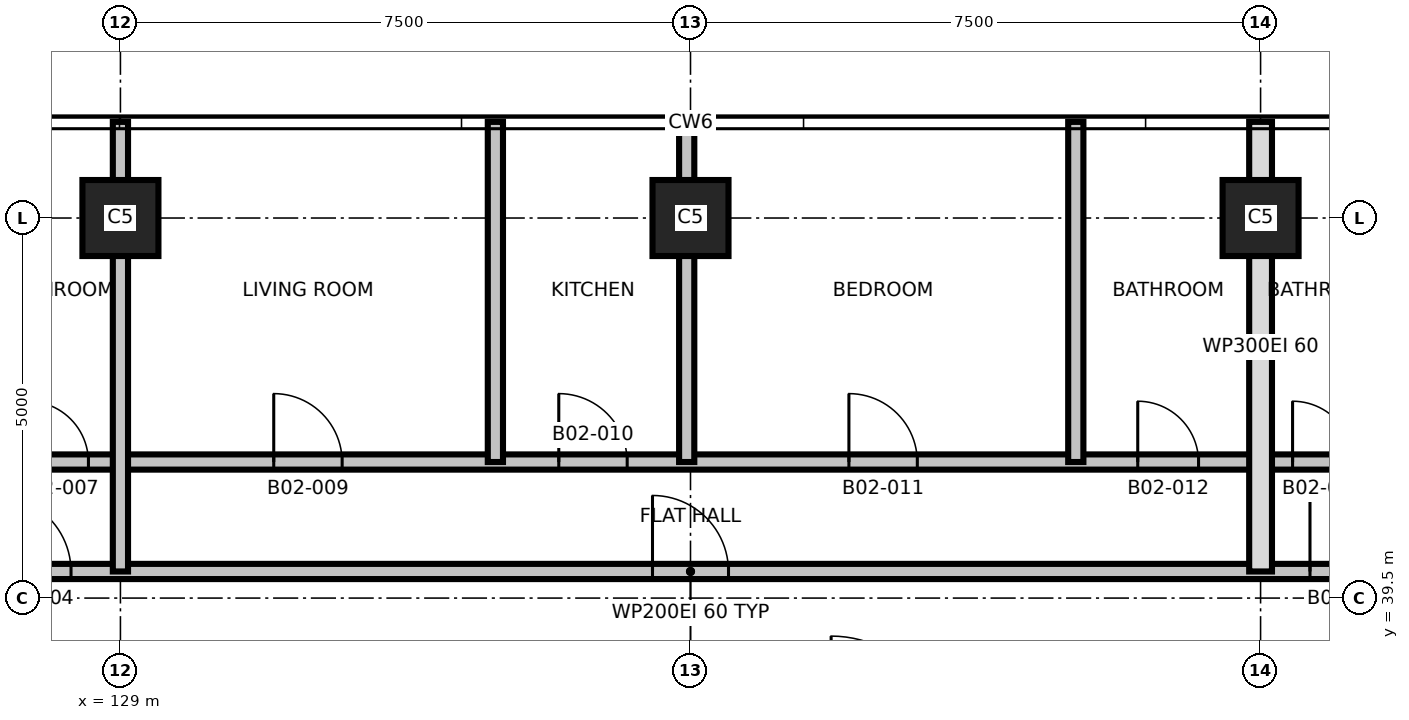
"""IFC4 building model, lengths in metres.
Left out: names, types, materials, properties, quantities, classifications, styles, units other than length and angle.
Written with IfcOpenShell. Run it as: python <this file> out.ifc"""

import sys

from ifc_helpers import new_model, si_unit, direction, frame, frame_2d, origin, origin_2d, place, context, subcontext, project, spatial, rectangle, extrude, element, fill, save


model = new_model("IFC4")
c1 = context("Model", 3, precision=1e-05, world=origin(), true_north=direction((0.0, 1.0)))
c2 = subcontext(c1, "Body", "Model", "MODEL_VIEW")
j1 = project(units=[si_unit("LENGTHUNIT", "METRE"), si_unit("PLANEANGLEUNIT", "RADIAN")], contexts=[c1])
p1 = place(None, origin())
s1 = spatial("IfcSite", under=j1, at=p1, CompositionType="ELEMENT")
p2 = place(p1, origin())
s2 = spatial("IfcBuilding", under=s1, at=p2, CompositionType="ELEMENT")
p3 = place(p2, frame((0.0, 0.0, 48.3)))
s3 = spatial("IfcBuildingStorey", under=s2, at=p3, CompositionType="ELEMENT", Elevation=48.3)
for number, where, z_axis, x_axis in (
    (1, (129.0, 44.5, 0.0), (0.0, 0.0, 1.0), (1.0, 0.0, 0.0)),
    (2, (136.5, 44.5, 0.0), (0.0, 0.0, 1.0), (1.0, 0.0, 0.0)),
    (3, (144.0, 44.5, 0.0), (0.0, 0.0, 1.0), (1.0, 0.0, 0.0)),
):
    element("IfcColumn", number, at=place(p3, frame(where, z_axis=z_axis, x_axis=x_axis)), inside=s3, PredefinedType="COLUMN", context=c2, shape_type="SweptSolid", body=[
        extrude(rectangle(XDim=1.0, YDim=1.0, at=origin_2d()), origin(), (0.0, 0.0, 1.0), 3.7),
    ])
p4 = place(p3, frame((120.235, 39.85, 0.0), z_axis=(0.0, 0.0, 1.0), x_axis=(1.0, 0.0, 0.0)))
e4 = element("IfcWall", 4, at=p4, inside=s3, PredefinedType="PARTITIONING", context=c2, shape_type="SweptSolid", body=[
    extrude(rectangle(XDim=32.53, YDim=0.2, at=frame_2d((16.265, 0.0))), origin(), (0.0, 0.0, 1.0), 3.4),
])
p5 = place(p4, frame((7.115, 0.0, 0.0)))
e5 = element("IfcOpeningElement", 5, at=p5, cuts=e4, PredefinedType="OPENING", context=c2, shape_type="SweptSolid", body=[
    extrude(rectangle(XDim=1.0, YDim=2.1, at=frame_2d((0.5, 1.05))), frame((0.0, 0.11, 0.0), z_axis=(0.0, -1.0, 0.0), x_axis=(1.0, 0.0, 0.0)), (0.0, 0.0, 1.0), 0.22),
])
p6 = place(p4, frame((15.765, 0.0, 0.0)))
e6 = element("IfcOpeningElement", 6, at=p6, cuts=e4, PredefinedType="OPENING", context=c2, shape_type="SweptSolid", body=[
    extrude(rectangle(XDim=1.0, YDim=2.1, at=frame_2d((0.5, 1.05))), frame((0.0, 0.11, 0.0), z_axis=(0.0, -1.0, 0.0), x_axis=(1.0, 0.0, 0.0)), (0.0, 0.0, 1.0), 0.22),
])
p7 = place(p4, frame((24.415, 0.0, 0.0)))
e7 = element("IfcOpeningElement", 7, at=p7, cuts=e4, PredefinedType="OPENING", context=c2, shape_type="SweptSolid", body=[
    extrude(rectangle(XDim=1.0, YDim=2.1, at=frame_2d((0.5, 1.05))), frame((0.0, 0.11, 0.0), z_axis=(0.0, -1.0, 0.0), x_axis=(1.0, 0.0, 0.0)), (0.0, 0.0, 1.0), 0.22),
])
p8 = place(p3, frame((120.44, 41.29, 0.0), z_axis=(0.0, 0.0, 1.0), x_axis=(1.0, 0.0, 0.0)))
e8 = element("IfcWall", 8, at=p8, inside=s3, PredefinedType="PARTITIONING", context=c2, shape_type="SweptSolid", body=[
    extrude(rectangle(XDim=32.12, YDim=0.2, at=frame_2d((16.06, 0.0))), origin(), (0.0, 0.0, 1.0), 3.4),
])
p9 = place(p8, frame((2.793, 0.0, 0.0)))
e9 = element("IfcOpeningElement", 9, at=p9, cuts=e8, PredefinedType="OPENING", context=c2, shape_type="SweptSolid", body=[
    extrude(rectangle(XDim=0.9, YDim=2.1, at=frame_2d((0.45, 1.05))), frame((0.0, 0.11, 0.0), z_axis=(0.0, -1.0, 0.0), x_axis=(1.0, 0.0, 0.0)), (0.0, 0.0, 1.0), 0.22),
])
p10 = place(p8, frame((5.504, 0.0, 0.0)))
e10 = element("IfcOpeningElement", 10, at=p10, cuts=e8, PredefinedType="OPENING", context=c2, shape_type="SweptSolid", body=[
    extrude(rectangle(XDim=0.9, YDim=2.1, at=frame_2d((0.45, 1.05))), frame((0.0, 0.11, 0.0), z_axis=(0.0, -1.0, 0.0), x_axis=(1.0, 0.0, 0.0)), (0.0, 0.0, 1.0), 0.22),
])
p11 = place(p8, frame((7.339, 0.0, 0.0)))
e11 = element("IfcOpeningElement", 11, at=p11, cuts=e8, PredefinedType="OPENING", context=c2, shape_type="SweptSolid", body=[
    extrude(rectangle(XDim=0.8, YDim=2.1, at=frame_2d((0.4, 1.05))), frame((0.0, 0.11, 0.0), z_axis=(0.0, -1.0, 0.0), x_axis=(1.0, 0.0, 0.0)), (0.0, 0.0, 1.0), 0.22),
])
p12 = place(p8, frame((10.577, 0.0, 0.0)))
e12 = element("IfcOpeningElement", 12, at=p12, cuts=e8, PredefinedType="OPENING", context=c2, shape_type="SweptSolid", body=[
    extrude(rectangle(XDim=0.9, YDim=2.1, at=frame_2d((0.45, 1.05))), frame((0.0, 0.11, 0.0), z_axis=(0.0, -1.0, 0.0), x_axis=(1.0, 0.0, 0.0)), (0.0, 0.0, 1.0), 0.22),
])
p13 = place(p8, frame((14.327, 0.0, 0.0)))
e13 = element("IfcOpeningElement", 13, at=p13, cuts=e8, PredefinedType="OPENING", context=c2, shape_type="SweptSolid", body=[
    extrude(rectangle(XDim=0.9, YDim=2.1, at=frame_2d((0.45, 1.05))), frame((0.0, 0.11, 0.0), z_axis=(0.0, -1.0, 0.0), x_axis=(1.0, 0.0, 0.0)), (0.0, 0.0, 1.0), 0.22),
])
p14 = place(p8, frame((18.144, 0.0, 0.0)))
e14 = element("IfcOpeningElement", 14, at=p14, cuts=e8, PredefinedType="OPENING", context=c2, shape_type="SweptSolid", body=[
    extrude(rectangle(XDim=0.9, YDim=2.1, at=frame_2d((0.45, 1.05))), frame((0.0, 0.11, 0.0), z_axis=(0.0, -1.0, 0.0), x_axis=(1.0, 0.0, 0.0)), (0.0, 0.0, 1.0), 0.22),
])
p15 = place(p8, frame((21.944, 0.0, 0.0)))
e15 = element("IfcOpeningElement", 15, at=p15, cuts=e8, PredefinedType="OPENING", context=c2, shape_type="SweptSolid", body=[
    extrude(rectangle(XDim=0.8, YDim=2.1, at=frame_2d((0.4, 1.05))), frame((0.0, 0.11, 0.0), z_axis=(0.0, -1.0, 0.0), x_axis=(1.0, 0.0, 0.0)), (0.0, 0.0, 1.0), 0.22),
])
p16 = place(p8, frame((23.981, 0.0, 0.0)))
e16 = element("IfcOpeningElement", 16, at=p16, cuts=e8, PredefinedType="OPENING", context=c2, shape_type="SweptSolid", body=[
    extrude(rectangle(XDim=0.8, YDim=2.1, at=frame_2d((0.4, 1.05))), frame((0.0, 0.11, 0.0), z_axis=(0.0, -1.0, 0.0), x_axis=(1.0, 0.0, 0.0)), (0.0, 0.0, 1.0), 0.22),
])
p17 = place(p8, frame((25.716, 0.0, 0.0)))
e17 = element("IfcOpeningElement", 17, at=p17, cuts=e8, PredefinedType="OPENING", context=c2, shape_type="SweptSolid", body=[
    extrude(rectangle(XDim=0.9, YDim=2.1, at=frame_2d((0.45, 1.05))), frame((0.0, 0.11, 0.0), z_axis=(0.0, -1.0, 0.0), x_axis=(1.0, 0.0, 0.0)), (0.0, 0.0, 1.0), 0.22),
])
p18 = place(p8, frame((28.427, 0.0, 0.0)))
e18 = element("IfcOpeningElement", 18, at=p18, cuts=e8, PredefinedType="OPENING", context=c2, shape_type="SweptSolid", body=[
    extrude(rectangle(XDim=0.9, YDim=2.1, at=frame_2d((0.45, 1.05))), frame((0.0, 0.11, 0.0), z_axis=(0.0, -1.0, 0.0), x_axis=(1.0, 0.0, 0.0)), (0.0, 0.0, 1.0), 0.22),
])
p19 = place(p3, frame((129.0, 39.85, 0.0), z_axis=(0.0, 0.0, 1.0), x_axis=(0.0, 1.0, 0.0)))
e19 = element("IfcWall", 19, at=p19, inside=s3, PredefinedType="PARTITIONING", context=c2, shape_type="SweptSolid", body=[
    extrude(rectangle(XDim=5.915, YDim=0.2, at=frame_2d((2.958, 0.0))), origin(), (0.0, 0.0, 1.0), 3.4),
])
for number, where, z_axis, x_axis in (
    (20, (133.933, 41.29, 0.0), (0.0, 0.0, 1.0), (0.0, 1.0, 0.0)),
    (21, (136.45, 41.29, 0.0), (0.0, 0.0, 1.0), (0.0, 1.0, 0.0)),
    (22, (141.569, 41.29, 0.0), (0.0, 0.0, 1.0), (0.0, 1.0, 0.0)),
):
    element("IfcWall", number, at=place(p3, frame(where, z_axis=z_axis, x_axis=x_axis)), inside=s3, PredefinedType="PARTITIONING", context=c2, shape_type="SweptSolid", body=[
        extrude(rectangle(XDim=4.475, YDim=0.2, at=frame_2d((2.237, 0.0))), origin(), (0.0, 0.0, 1.0), 3.4),
    ])
p20 = place(p3, frame((144.0, 39.85, 0.0), z_axis=(0.0, 0.0, 1.0), x_axis=(0.0, 1.0, 0.0)))
e23 = element("IfcWall", 23, at=p20, inside=s3, PredefinedType="PARTITIONING", context=c2, shape_type="SweptSolid", body=[
    extrude(rectangle(XDim=5.915, YDim=0.3, at=frame_2d((2.958, 0.0))), origin(), (0.0, 0.0, 1.0), 3.4),
])
p21 = place(p5, origin())
e24 = element("IfcDoor", 24, at=p21, inside=s3, OperationType="SINGLE_SWING_RIGHT", PredefinedType="DOOR", context=c2, shape_type="SweptSolid", body=[
    extrude(rectangle(XDim=1.0, YDim=2.1, at=frame_2d((0.5, 1.05))), frame((0.0, 0.025, 0.0), z_axis=(0.0, -1.0, 0.0), x_axis=(1.0, 0.0, 0.0)), (0.0, 0.0, 1.0), 0.05),
])
fill(e5, e24)
p22 = place(p11, origin())
e25 = element("IfcDoor", 25, at=p22, inside=s3, OperationType="SINGLE_SWING_LEFT", PredefinedType="DOOR", context=c2, shape_type="SweptSolid", body=[
    extrude(rectangle(XDim=0.8, YDim=2.1, at=frame_2d((0.4, 1.05))), frame((0.0, 0.025, 0.0), z_axis=(0.0, -1.0, 0.0), x_axis=(1.0, 0.0, 0.0)), (0.0, 0.0, 1.0), 0.05),
])
fill(e11, e25)
p23 = place(p6, origin())
e26 = element("IfcDoor", 26, at=p23, inside=s3, OperationType="SINGLE_SWING_RIGHT", PredefinedType="DOOR", context=c2, shape_type="SweptSolid", body=[
    extrude(rectangle(XDim=1.0, YDim=2.1, at=frame_2d((0.5, 1.05))), frame((0.0, 0.025, 0.0), z_axis=(0.0, -1.0, 0.0), x_axis=(1.0, 0.0, 0.0)), (0.0, 0.0, 1.0), 0.05),
])
fill(e6, e26)
p24 = place(p12, origin())
e27 = element("IfcDoor", 27, at=p24, inside=s3, OperationType="SINGLE_SWING_LEFT", PredefinedType="DOOR", context=c2, shape_type="SweptSolid", body=[
    extrude(rectangle(XDim=0.9, YDim=2.1, at=frame_2d((0.45, 1.05))), frame((0.0, 0.025, 0.0), z_axis=(0.0, -1.0, 0.0), x_axis=(1.0, 0.0, 0.0)), (0.0, 0.0, 1.0), 0.05),
])
fill(e12, e27)
p25 = place(p13, origin())
e28 = element("IfcDoor", 28, at=p25, inside=s3, OperationType="SINGLE_SWING_RIGHT", PredefinedType="DOOR", context=c2, shape_type="SweptSolid", body=[
    extrude(rectangle(XDim=0.9, YDim=2.1, at=frame_2d((0.45, 1.05))), frame((0.0, 0.025, 0.0), z_axis=(0.0, -1.0, 0.0), x_axis=(1.0, 0.0, 0.0)), (0.0, 0.0, 1.0), 0.05),
])
fill(e13, e28)
p26 = place(p14, origin())
e29 = element("IfcDoor", 29, at=p26, inside=s3, OperationType="SINGLE_SWING_LEFT", PredefinedType="DOOR", context=c2, shape_type="SweptSolid", body=[
    extrude(rectangle(XDim=0.9, YDim=2.1, at=frame_2d((0.45, 1.05))), frame((0.0, 0.025, 0.0), z_axis=(0.0, -1.0, 0.0), x_axis=(1.0, 0.0, 0.0)), (0.0, 0.0, 1.0), 0.05),
])
fill(e14, e29)
p27 = place(p15, origin())
e30 = element("IfcDoor", 30, at=p27, inside=s3, OperationType="SINGLE_SWING_RIGHT", PredefinedType="DOOR", context=c2, shape_type="SweptSolid", body=[
    extrude(rectangle(XDim=0.8, YDim=2.1, at=frame_2d((0.4, 1.05))), frame((0.0, 0.025, 0.0), z_axis=(0.0, -1.0, 0.0), x_axis=(1.0, 0.0, 0.0)), (0.0, 0.0, 1.0), 0.05),
])
fill(e15, e30)
p28 = place(p7, origin())
e31 = element("IfcDoor", 31, at=p28, inside=s3, OperationType="SINGLE_SWING_LEFT", PredefinedType="DOOR", context=c2, shape_type="SweptSolid", body=[
    extrude(rectangle(XDim=1.0, YDim=2.1, at=frame_2d((0.5, 1.05))), frame((0.0, 0.025, 0.0), z_axis=(0.0, -1.0, 0.0), x_axis=(1.0, 0.0, 0.0)), (0.0, 0.0, 1.0), 0.05),
])
fill(e7, e31)
p29 = place(p16, origin())
e32 = element("IfcDoor", 32, at=p29, inside=s3, OperationType="SINGLE_SWING_RIGHT", PredefinedType="DOOR", context=c2, shape_type="SweptSolid", body=[
    extrude(rectangle(XDim=0.8, YDim=2.1, at=frame_2d((0.4, 1.05))), frame((0.0, 0.025, 0.0), z_axis=(0.0, -1.0, 0.0), x_axis=(1.0, 0.0, 0.0)), (0.0, 0.0, 1.0), 0.05),
])
fill(e16, e32)
save(model, sys.argv[1])
